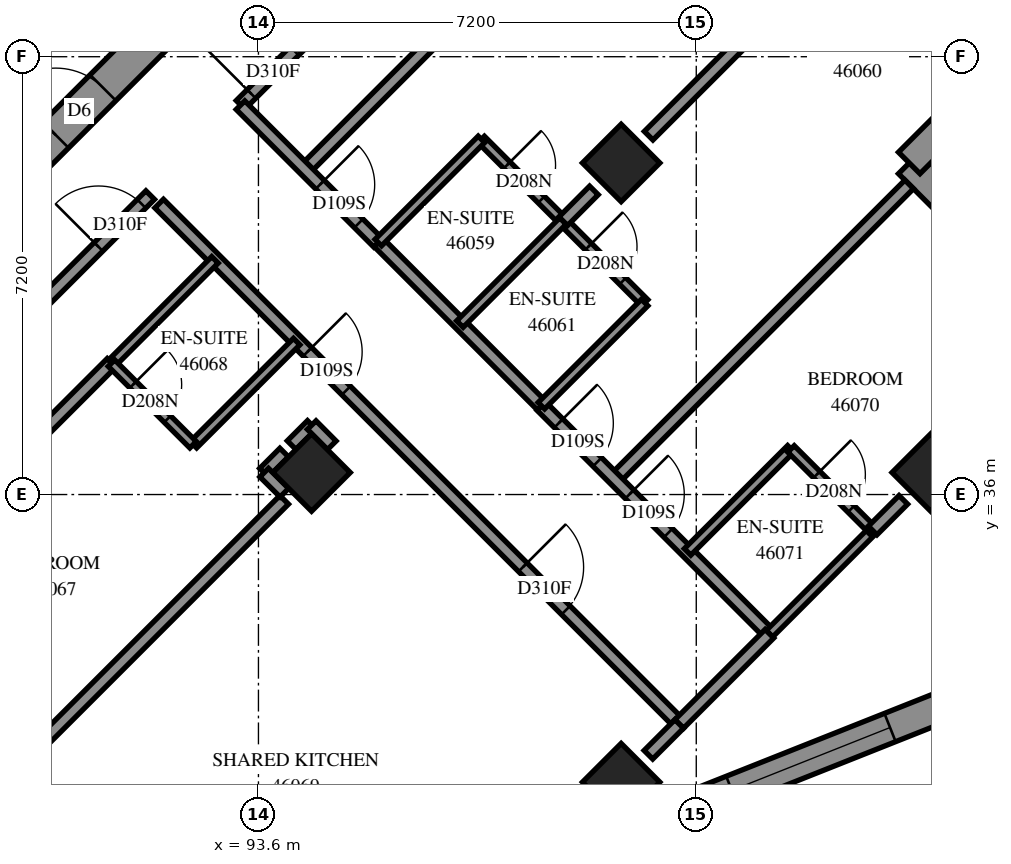
"""IFC4 building model, lengths in metres.
Left out: names, types, materials, properties, quantities, classifications, styles, units other than length and angle.
Written with IfcOpenShell. Run it as: python <this file> out.ifc"""

import sys

from ifc_helpers import new_model, si_unit, direction, frame, frame_2d, origin, origin_2d, place, context, subcontext, project, spatial, polyline, rectangle, outline, extrude, element, fill, save


model = new_model("IFC4")
c1 = context("Model", 3, precision=1e-05, world=origin(), true_north=direction((0.0, 1.0)))
c2 = subcontext(c1, "Body", "Model", "MODEL_VIEW")
j1 = project(units=[si_unit("LENGTHUNIT", "METRE"), si_unit("PLANEANGLEUNIT", "RADIAN")], contexts=[c1])
p1 = place(None, origin())
s1 = spatial("IfcSite", under=j1, at=p1, CompositionType="ELEMENT")
p2 = place(p1, origin())
s2 = spatial("IfcBuilding", under=s1, at=p2, CompositionType="ELEMENT")
p3 = place(p2, frame((0.0, 0.0, 169.4)))
s3 = spatial("IfcBuildingStorey", under=s2, at=p3, CompositionType="ELEMENT", Elevation=169.4)
for number, where, z_axis, x_axis in (
    (1, (99.565, 41.453, 0.0), (0.0, 0.0, 1.0), (0.707, -0.707, 0.0)),
    (2, (94.474, 36.362, 0.0), (0.0, 0.0, 1.0), (0.707, -0.707, 0.0)),
    (3, (104.656, 36.362, 0.0), (0.0, 0.0, 1.0), (0.707, -0.707, 0.0)),
    (4, (99.565, 31.271, 0.0), (0.0, 0.0, 1.0), (0.707, -0.707, 0.0)),
):
    element("IfcColumn", number, at=place(p3, frame(where, z_axis=z_axis, x_axis=x_axis)), inside=s3, PredefinedType="COLUMN", context=c2, shape_type="SweptSolid", body=[
        extrude(rectangle(XDim=0.9, YDim=0.9, at=origin_2d()), origin(), (0.0, 0.0, 1.0), 3.1),
    ])
p4 = place(p3, frame((87.049, 38.695, -0.3), z_axis=(0.0, 0.0, 1.0), x_axis=(0.7071067812, 0.7071067812, 0.0)))
e5 = element("IfcWall", 5, at=p4, inside=s3, PredefinedType="SHEAR", context=c2, shape_type="SweptSolid", body=[
    extrude(rectangle(XDim=14.4, YDim=0.6, at=frame_2d((7.2, 0.0))), origin(), (0.0, 0.0, 1.0), 2.7),
])
p5 = place(p4, frame((4.55, 0.0, 0.3)))
e6 = element("IfcOpeningElement", 6, at=p5, cuts=e5, PredefinedType="OPENING", context=c2, shape_type="SweptSolid", body=[
    extrude(rectangle(XDim=1.1, YDim=2.1, at=frame_2d((0.55, 1.05))), frame((0.0, 0.31, 0.0), z_axis=(0.0, -1.0, 0.0), x_axis=(1.0, 0.0, 0.0)), (0.0, 0.0, 1.0), 0.62),
])
p6 = place(p4, frame((11.35, 0.0, 0.3)))
e7 = element("IfcOpeningElement", 7, at=p6, cuts=e5, PredefinedType="OPENING", context=c2, shape_type="SweptSolid", body=[
    extrude(rectangle(XDim=1.1, YDim=2.1, at=frame_2d((0.55, 1.05))), frame((0.0, 0.31, 0.0), z_axis=(0.0, -1.0, 0.0), x_axis=(1.0, 0.0, 0.0)), (0.0, 0.0, 1.0), 0.62),
])
p7 = place(p3, frame((100.785, 30.896, 0.0), z_axis=(0.0, 0.0, 1.0), x_axis=(0.9293291345, 0.3692524338, 0.0)))
e8 = element("IfcWall", 8, at=p7, inside=s3, PredefinedType="SOLIDWALL", context=c2, shape_type="SweptSolid", body=[
    extrude(outline(polyline([(0.108, -0.25), (5.663, -0.25), (5.437, 0.25), (-0.108, 0.25), (0.108, -0.25)])), origin(), (0.0, 0.0, 1.0), 3.1),
])
p8 = place(p7, frame((0.645, 0.0, 0.45)))
e9 = element("IfcOpeningElement", 9, at=p8, cuts=e8, PredefinedType="OPENING", context=c2, shape_type="SweptSolid", body=[
    extrude(rectangle(XDim=2.8, YDim=2.5, at=frame_2d((1.4, 1.25))), frame((0.0, 0.26, 0.0), z_axis=(0.0, -1.0, 0.0), x_axis=(1.0, 0.0, 0.0)), (0.0, 0.0, 1.0), 0.52),
])
p9 = place(p3, frame((107.761, 37.994, 0.0), z_axis=(0.0, 0.0, 1.0), x_axis=(-0.7071170031, 0.7070965591, 0.0)))
e10 = element("IfcWall", 10, at=p9, inside=s3, PredefinedType="SOLIDWALL", context=c2, shape_type="SweptSolid", body=[
    extrude(outline(polyline([(-0.159, -0.25), (4.641, -0.25), (5.141, 0.25), (0.159, 0.25), (-0.159, -0.25)])), origin(), (0.0, 0.0, 1.0), 3.1),
])
p10 = place(p9, frame((1.966, 0.0, 0.6)))
e11 = element("IfcOpeningElement", 11, at=p10, cuts=e10, PredefinedType="OPENING", context=c2, shape_type="SweptSolid", body=[
    extrude(rectangle(XDim=1.8, YDim=1.9, at=frame_2d((0.9, 0.95))), frame((0.0, 0.26, 0.0), z_axis=(0.0, -1.0, 0.0), x_axis=(1.0, 0.0, 0.0)), (0.0, 0.0, 1.0), 0.52),
])
p11 = place(p3, frame((104.302, 41.453, 0.0), z_axis=(0.0, 0.0, 1.0), x_axis=(0.7071237335, 0.7070898285, 0.0)))
e12 = element("IfcWall", 12, at=p11, inside=s3, PredefinedType="SOLIDWALL", context=c2, shape_type="SweptSolid", body=[
    extrude(outline(polyline([(0.25, -0.25), (6.253, -0.25), (5.545, 0.25), (-0.25, 0.25), (0.25, -0.25)])), origin(), (0.0, 0.0, 1.0), 2.6),
])
p12 = place(p11, frame((1.125, 0.0, 0.6)))
e13 = element("IfcOpeningElement", 13, at=p12, cuts=e12, PredefinedType="OPENING", context=c2, shape_type="SweptSolid", body=[
    extrude(rectangle(XDim=1.8, YDim=1.9, at=frame_2d((0.9, 0.95))), frame((0.0, 0.26, 0.0), z_axis=(0.0, -1.0, 0.0), x_axis=(1.0, 0.0, 0.0)), (0.0, 0.0, 1.0), 0.52),
])
p13 = place(p11, frame((3.997, 0.0, 0.6)))
e14 = element("IfcOpeningElement", 14, at=p13, cuts=e12, PredefinedType="OPENING", context=c2, shape_type="SweptSolid", body=[
    extrude(rectangle(XDim=1.2, YDim=1.9, at=frame_2d((0.6, 0.95))), frame((0.0, 0.26, 0.0), z_axis=(0.0, -1.0, 0.0), x_axis=(1.0, 0.0, 0.0)), (0.0, 0.0, 1.0), 0.52),
])
p14 = place(p3, frame((94.366, 41.348, 0.0), z_axis=(0.0, 0.0, 1.0), x_axis=(0.7071108904, 0.707102672, 0.0)))
e15 = element("IfcWall", 15, at=p14, inside=s3, PredefinedType="PARTITIONING", context=c2, shape_type="SweptSolid", body=[
    extrude(rectangle(XDim=12.168, YDim=0.2, at=frame_2d((6.084, 0.0))), origin(), (0.0, 0.0, 1.0), 3.1),
])
p15 = place(p3, frame((91.967, 40.785, 0.0), z_axis=(0.0, 0.0, 1.0), x_axis=(0.7071067812, -0.7071067812, 0.0)))
e16 = element("IfcWall", 16, at=p15, inside=s3, PredefinedType="PARTITIONING", context=c2, shape_type="SweptSolid", body=[
    extrude(rectangle(XDim=12.1, YDim=0.2, at=frame_2d((6.05, 0.0))), origin(), (0.0, 0.0, 1.0), 3.1),
])
p16 = place(p15, frame((3.448, 0.0, 0.0)))
e17 = element("IfcOpeningElement", 17, at=p16, cuts=e16, PredefinedType="OPENING", context=c2, shape_type="SweptSolid", body=[
    extrude(rectangle(XDim=0.9, YDim=2.1, at=frame_2d((0.45, 1.05))), frame((0.0, 0.11, 0.0), z_axis=(0.0, -1.0, 0.0), x_axis=(1.0, 0.0, 0.0)), (0.0, 0.0, 1.0), 0.22),
])
p17 = place(p15, frame((8.457, 0.0, 0.0)))
e18 = element("IfcOpeningElement", 18, at=p17, cuts=e16, PredefinedType="OPENING", context=c2, shape_type="SweptSolid", body=[
    extrude(rectangle(XDim=1.0, YDim=2.1, at=frame_2d((0.5, 1.05))), frame((0.0, 0.11, 0.0), z_axis=(0.0, -1.0, 0.0), x_axis=(1.0, 0.0, 0.0)), (0.0, 0.0, 1.0), 0.22),
])
p18 = place(p3, frame((93.306, 42.408, 0.0), z_axis=(0.0, 0.0, 1.0), x_axis=(0.7071067812, 0.7071067812, 0.0)))
e19 = element("IfcWall", 19, at=p18, inside=s3, PredefinedType="PARTITIONING", context=c2, shape_type="SweptSolid", body=[
    extrude(rectangle(XDim=9.45, YDim=0.2, at=frame_2d((4.725, 0.0))), origin(), (0.0, 0.0, 1.0), 3.1),
])
p19 = place(p18, frame((0.253, 0.0, 0.0)))
e20 = element("IfcOpeningElement", 20, at=p19, cuts=e19, PredefinedType="OPENING", context=c2, shape_type="SweptSolid", body=[
    extrude(rectangle(XDim=1.0, YDim=2.1, at=frame_2d((0.5, 1.05))), frame((0.0, 0.11, 0.0), z_axis=(0.0, -1.0, 0.0), x_axis=(1.0, 0.0, 0.0)), (0.0, 0.0, 1.0), 0.22),
])
p20 = place(p3, frame((86.834, 35.94, 0.0), z_axis=(0.0, 0.0, 1.0), x_axis=(0.7072486139, 0.7069649201, 0.0)))
e21 = element("IfcWall", 21, at=p20, inside=s3, PredefinedType="PARTITIONING", context=c2, shape_type="SweptSolid", body=[
    extrude(rectangle(XDim=7.05, YDim=0.2, at=frame_2d((3.525, 0.0))), origin(), (0.0, 0.0, 1.0), 3.1),
])
p21 = place(p20, frame((5.848, 0.0, 0.0)))
e22 = element("IfcOpeningElement", 22, at=p21, cuts=e21, PredefinedType="OPENING", context=c2, shape_type="SweptSolid", body=[
    extrude(rectangle(XDim=1.0, YDim=2.1, at=frame_2d((0.5, 1.05))), frame((0.0, 0.11, 0.0), z_axis=(0.0, -1.0, 0.0), x_axis=(1.0, 0.0, 0.0)), (0.0, 0.0, 1.0), 0.22),
])
p22 = place(p3, frame((86.329, 33.313, 0.0), z_axis=(0.0, 0.0, 1.0), x_axis=(0.7072524502, 0.7069610821, 0.0)))
e23 = element("IfcWall", 23, at=p22, inside=s3, PredefinedType="PARTITIONING", context=c2, shape_type="SweptSolid", body=[
    extrude(rectangle(XDim=6.864, YDim=0.2, at=frame_2d((3.432, 0.0))), origin(), (0.0, 0.0, 1.0), 3.1),
])
p23 = place(p3, frame((99.458, 36.256, 0.0), z_axis=(0.0, 0.0, 1.0), x_axis=(0.7071067812, 0.7071067812, 0.0)))
e24 = element("IfcWall", 24, at=p23, inside=s3, PredefinedType="PARTITIONING", context=c2, shape_type="SweptSolid", body=[
    extrude(rectangle(XDim=6.85, YDim=0.2, at=frame_2d((3.425, 0.0))), origin(), (0.0, 0.0, 1.0), 3.1),
])
p24 = place(p3, frame((89.831, 31.721, 0.0), z_axis=(0.0, 0.0, 1.0), x_axis=(0.7071067812, 0.7071067812, 0.0)))
e25 = element("IfcWall", 25, at=p24, inside=s3, PredefinedType="PARTITIONING", context=c2, shape_type="SweptSolid", body=[
    extrude(rectangle(XDim=5.928, YDim=0.2, at=frame_2d((2.964, 0.0))), origin(), (0.0, 0.0, 1.0), 3.1),
])
p25 = place(p3, frame((100.017, 41.901, 0.0), z_axis=(0.0, 0.0, 1.0), x_axis=(0.7072754814, 0.7069380408, 0.0)))
e26 = element("IfcWall", 26, at=p25, inside=s3, PredefinedType="PARTITIONING", context=c2, shape_type="SweptSolid", body=[
    extrude(rectangle(XDim=5.927, YDim=0.2, at=frame_2d((2.963, 0.0))), origin(), (0.0, 0.0, 1.0), 3.1),
])
p26 = place(p3, frame((98.253, 37.455, 0.0), z_axis=(0.0, 0.0, 1.0), x_axis=(0.7071067812, -0.7071067812, 0.0)))
e27 = element("IfcWall", 27, at=p26, inside=s3, PredefinedType="PARTITIONING", context=c2, shape_type="SweptSolid", body=[
    extrude(rectangle(XDim=5.301, YDim=0.2, at=frame_2d((2.65, 0.0))), origin(), (0.0, 0.0, 1.0), 3.1),
])
p27 = place(p26, frame((0.401, 0.0, 0.0)))
e28 = element("IfcOpeningElement", 28, at=p27, cuts=e27, PredefinedType="OPENING", context=c2, shape_type="SweptSolid", body=[
    extrude(rectangle(XDim=0.9, YDim=2.1, at=frame_2d((0.45, 1.05))), frame((0.0, 0.11, 0.0), z_axis=(0.0, -1.0, 0.0), x_axis=(1.0, 0.0, 0.0)), (0.0, 0.0, 1.0), 0.22),
])
p28 = place(p26, frame((2.05, 0.0, 0.0)))
e29 = element("IfcOpeningElement", 29, at=p28, cuts=e27, PredefinedType="OPENING", context=c2, shape_type="SweptSolid", body=[
    extrude(rectangle(XDim=0.9, YDim=2.1, at=frame_2d((0.45, 1.05))), frame((0.0, 0.11, 0.0), z_axis=(0.0, -1.0, 0.0), x_axis=(1.0, 0.0, 0.0)), (0.0, 0.0, 1.0), 0.22),
])
p29 = place(p3, frame((97.263, 41.839, 0.0), z_axis=(0.0, 0.0, 1.0), x_axis=(0.7071067812, -0.7071067812, 0.0)))
e30 = element("IfcWall", 30, at=p29, inside=s3, PredefinedType="PARTITIONING", context=c2, shape_type="SweptSolid", body=[
    extrude(rectangle(XDim=3.801, YDim=0.15, at=frame_2d((1.901, 0.0))), origin(), (0.0, 0.0, 1.0), 3.1),
])
p30 = place(p29, frame((0.598, 0.0, 0.0)))
e31 = element("IfcOpeningElement", 31, at=p30, cuts=e30, PredefinedType="OPENING", context=c2, shape_type="SweptSolid", body=[
    extrude(rectangle(XDim=0.8, YDim=2.1, at=frame_2d((0.4, 1.05))), frame((0.0, 0.085, 0.0), z_axis=(0.0, -1.0, 0.0), x_axis=(1.0, 0.0, 0.0)), (0.0, 0.0, 1.0), 0.17),
])
p31 = place(p29, frame((2.493, 0.0, 0.0)))
e32 = element("IfcOpeningElement", 32, at=p31, cuts=e30, PredefinedType="OPENING", context=c2, shape_type="SweptSolid", body=[
    extrude(rectangle(XDim=0.8, YDim=2.1, at=frame_2d((0.4, 1.05))), frame((0.0, 0.085, 0.0), z_axis=(0.0, -1.0, 0.0), x_axis=(1.0, 0.0, 0.0)), (0.0, 0.0, 1.0), 0.17),
])
p32 = place(p3, frame((95.573, 40.148, 0.0), z_axis=(0.0, 0.0, 1.0), x_axis=(0.7068698107, -0.7073436723, 0.0)))
e33 = element("IfcWall", 33, at=p32, inside=s3, PredefinedType="PARTITIONING", context=c2, shape_type="SweptSolid", body=[
    extrude(rectangle(XDim=3.799, YDim=0.2, at=frame_2d((1.899, 0.0))), origin(), (0.0, 0.0, 1.0), 3.1),
])
p33 = place(p3, frame((93.305, 42.403, 0.0), z_axis=(0.0, 0.0, 1.0), x_axis=(0.7071067812, -0.7071067812, 0.0)))
e34 = element("IfcWall", 34, at=p33, inside=s3, PredefinedType="PARTITIONING", context=c2, shape_type="SweptSolid", body=[
    extrude(rectangle(XDim=3.199, YDim=0.2, at=frame_2d((1.599, 0.0))), origin(), (0.0, 0.0, 1.0), 3.1),
])
p34 = place(p33, frame((1.848, 0.0, 0.0)))
e35 = element("IfcOpeningElement", 35, at=p34, cuts=e34, PredefinedType="OPENING", context=c2, shape_type="SweptSolid", body=[
    extrude(rectangle(XDim=0.9, YDim=2.1, at=frame_2d((0.45, 1.05))), frame((0.0, 0.11, 0.0), z_axis=(0.0, -1.0, 0.0), x_axis=(1.0, 0.0, 0.0)), (0.0, 0.0, 1.0), 0.22),
])
p35 = place(p3, frame((102.003, 33.711, 0.0), z_axis=(0.0, 0.0, 1.0), x_axis=(0.7071067812, 0.7071067812, 0.0)))
e36 = element("IfcWall", 36, at=p35, inside=s3, PredefinedType="PARTITIONING", context=c2, shape_type="SweptSolid", body=[
    extrude(rectangle(XDim=2.401, YDim=0.15, at=frame_2d((1.201, 0.0))), origin(), (0.0, 0.0, 1.0), 2.6),
])
for number, where, z_axis, x_axis in (
    (37, (95.571, 40.143, 0.0), (0.0, 0.0, 1.0), (0.707, 0.708, 0.0)),
    (38, (98.253, 37.461, 0.0), (0.0, 0.0, 1.0), (0.708, 0.707, 0.0)),
    (39, (100.657, 35.057, 0.0), (0.0, 0.0, 1.0), (0.708, 0.707, 0.0)),
    (40, (91.189, 38.161, 0.0), (0.0, 0.0, 1.0), (0.707, 0.708, 0.0)),
    (41, (92.531, 36.819, 0.0), (0.0, 0.0, 1.0), (0.708, 0.707, 0.0)),
):
    element("IfcWall", number, at=place(p3, frame(where, z_axis=z_axis, x_axis=x_axis)), inside=s3, PredefinedType="PARTITIONING", context=c2, shape_type="SweptSolid", body=[
        extrude(rectangle(XDim=2.4, YDim=0.15, at=frame_2d((1.2, 0.0))), origin(), (0.0, 0.0, 1.0), 3.1),
    ])
p36 = place(p3, frame((96.913, 38.803, 0.0), z_axis=(0.0, 0.0, 1.0), x_axis=(0.7071067812, 0.7071067812, 0.0)))
e42 = element("IfcWall", 42, at=p36, inside=s3, PredefinedType="PARTITIONING", context=c2, shape_type="SweptSolid", body=[
    extrude(rectangle(XDim=2.398, YDim=0.15, at=frame_2d((1.199, 0.0))), origin(), (0.0, 0.0, 1.0), 3.1),
])
p37 = place(p3, frame((100.519, 32.227, 0.0), z_axis=(0.0, 0.0, 1.0), x_axis=(0.7071067812, 0.7071067812, 0.0)))
e43 = element("IfcWall", 43, at=p37, inside=s3, PredefinedType="PARTITIONING", context=c2, shape_type="SweptSolid", body=[
    extrude(rectangle(XDim=2.099, YDim=0.2, at=frame_2d((1.049, 0.0))), origin(), (0.0, 0.0, 1.0), 2.6),
])
p38 = place(p3, frame((102.358, 36.75, 0.0), z_axis=(0.0, 0.0, 1.0), x_axis=(0.7076330979, -0.7065800724, 0.0)))
e44 = element("IfcWall", 44, at=p38, inside=s3, PredefinedType="PARTITIONING", context=c2, shape_type="SweptSolid", body=[
    extrude(rectangle(XDim=1.899, YDim=0.15, at=frame_2d((0.95, 0.0))), origin(), (0.0, 0.0, 1.0), 3.1),
])
p39 = place(p38, frame((0.597, 0.0, 0.0)))
e45 = element("IfcOpeningElement", 45, at=p39, cuts=e44, PredefinedType="OPENING", context=c2, shape_type="SweptSolid", body=[
    extrude(rectangle(XDim=0.8, YDim=2.1, at=frame_2d((0.4, 1.05))), frame((0.0, 0.085, 0.0), z_axis=(0.0, -1.0, 0.0), x_axis=(1.0, 0.0, 0.0)), (0.0, 0.0, 1.0), 0.17),
])
p40 = place(p3, frame((91.183, 38.161, 0.0), z_axis=(0.0, 0.0, 1.0), x_axis=(0.7071067812, -0.7071067812, 0.0)))
e46 = element("IfcWall", 46, at=p40, inside=s3, PredefinedType="PARTITIONING", context=c2, shape_type="SweptSolid", body=[
    extrude(rectangle(XDim=1.898, YDim=0.15, at=frame_2d((0.949, 0.0))), origin(), (0.0, 0.0, 1.0), 3.1),
])
p41 = place(p40, frame((0.501, 0.0, 0.0)))
e47 = element("IfcOpeningElement", 47, at=p41, cuts=e46, PredefinedType="OPENING", context=c2, shape_type="SweptSolid", body=[
    extrude(rectangle(XDim=0.8, YDim=2.1, at=frame_2d((0.4, 1.05))), frame((0.0, 0.085, 0.0), z_axis=(0.0, -1.0, 0.0), x_axis=(1.0, 0.0, 0.0)), (0.0, 0.0, 1.0), 0.17),
])
p42 = place(p3, frame((100.013, 31.721, 0.0), z_axis=(0.0, 0.0, 1.0), x_axis=(0.7071067812, 0.7071067812, 0.0)))
e48 = element("IfcWall", 48, at=p42, inside=s3, PredefinedType="PARTITIONING", context=c2, shape_type="SweptSolid", body=[
    extrude(rectangle(XDim=0.716, YDim=0.2, at=frame_2d((0.358, 0.0))), origin(), (0.0, 0.0, 1.0), 2.6),
])
p43 = place(p3, frame((98.613, 40.495, 0.0), z_axis=(0.0, 0.0, 1.0), x_axis=(0.7057051861, 0.7085056035, 0.0)))
e49 = element("IfcWall", 49, at=p43, inside=s3, PredefinedType="PARTITIONING", context=c2, shape_type="SweptSolid", body=[
    extrude(rectangle(XDim=0.714, YDim=0.2, at=frame_2d((0.357, 0.0))), origin(), (0.0, 0.0, 1.0), 3.1),
])
p44 = place(p3, frame((103.701, 35.409, 0.0), z_axis=(0.0, 0.0, 1.0), x_axis=(0.7071067812, 0.7071067812, 0.0)))
e50 = element("IfcWall", 50, at=p44, inside=s3, PredefinedType="PARTITIONING", context=c2, shape_type="SweptSolid", body=[
    extrude(rectangle(XDim=0.713, YDim=0.2, at=frame_2d((0.356, 0.0))), origin(), (0.0, 0.0, 1.0), 2.6),
])
for number, where, z_axis, x_axis in (
    (51, (94.145, 36.813, 0.0), (0.0, 0.0, 1.0), (0.707, 0.707, 0.0)),
    (52, (93.691, 36.359, 0.0), (0.0, 0.0, 1.0), (0.707, 0.707, 0.0)),
):
    element("IfcWall", number, at=place(p3, frame(where, z_axis=z_axis, x_axis=x_axis)), inside=s3, PredefinedType="PARTITIONING", context=c2, shape_type="SweptSolid", body=[
        extrude(rectangle(XDim=0.469, YDim=0.2, at=frame_2d((0.235, 0.0))), origin(), (0.0, 0.0, 1.0), 3.1),
    ])
for number, where, z_axis, x_axis in (
    (53, (94.476, 37.142, 0.0), (0.0, 0.0, 1.0), (0.705, -0.709, 0.0)),
    (54, (93.695, 36.361, 0.0), (0.0, 0.0, 1.0), (0.709, -0.705, 0.0)),
):
    element("IfcWall", number, at=place(p3, frame(where, z_axis=z_axis, x_axis=x_axis)), inside=s3, PredefinedType="PARTITIONING", context=c2, shape_type="SweptSolid", body=[
        extrude(rectangle(XDim=0.468, YDim=0.2, at=frame_2d((0.234, 0.0))), origin(), (0.0, 0.0, 1.0), 3.1),
    ])
p45 = place(p8, origin())
e55 = element("IfcWindow", 55, at=p45, inside=s3, PartitioningType="SINGLE_PANEL", PredefinedType="WINDOW", context=c2, shape_type="SweptSolid", body=[
    extrude(rectangle(XDim=2.8, YDim=2.5, at=frame_2d((1.4, 1.25))), frame((0.0, 0.18, 0.0), z_axis=(0.0, -1.0, 0.0), x_axis=(1.0, 0.0, 0.0)), (0.0, 0.0, 1.0), 0.06),
])
fill(e9, e55)
p46 = place(p5, origin())
e56 = element("IfcDoor", 56, at=p46, inside=s3, OperationType="DOUBLE_DOOR_SINGLE_SWING", PredefinedType="DOOR", context=c2, shape_type="SweptSolid", body=[
    extrude(rectangle(XDim=1.1, YDim=2.1, at=frame_2d((0.55, 1.05))), frame((0.0, 0.025, 0.0), z_axis=(0.0, -1.0, 0.0), x_axis=(1.0, 0.0, 0.0)), (0.0, 0.0, 1.0), 0.05),
])
fill(e6, e56)
p47 = place(p19, origin())
e57 = element("IfcDoor", 57, at=p47, inside=s3, OperationType="SINGLE_SWING_RIGHT", PredefinedType="DOOR", context=c2, shape_type="SweptSolid", body=[
    extrude(rectangle(XDim=1.0, YDim=2.1, at=frame_2d((0.5, 1.05))), frame((0.0, 0.025, 0.0), z_axis=(0.0, -1.0, 0.0), x_axis=(1.0, 0.0, 0.0)), (0.0, 0.0, 1.0), 0.05),
])
fill(e20, e57)
p48 = place(p34, origin())
e58 = element("IfcDoor", 58, at=p48, inside=s3, OperationType="SINGLE_SWING_RIGHT", PredefinedType="DOOR", context=c2, shape_type="SweptSolid", body=[
    extrude(rectangle(XDim=0.9, YDim=2.1, at=frame_2d((0.45, 1.05))), frame((0.0, 0.025, 0.0), z_axis=(0.0, -1.0, 0.0), x_axis=(1.0, 0.0, 0.0)), (0.0, 0.0, 1.0), 0.05),
])
fill(e35, e58)
p49 = place(p30, origin())
e59 = element("IfcDoor", 59, at=p49, inside=s3, OperationType="SINGLE_SWING_RIGHT", PredefinedType="DOOR", context=c2, shape_type="SweptSolid", body=[
    extrude(rectangle(XDim=0.8, YDim=2.1, at=frame_2d((0.4, 1.05))), frame((0.0, 0.025, 0.0), z_axis=(0.0, -1.0, 0.0), x_axis=(1.0, 0.0, 0.0)), (0.0, 0.0, 1.0), 0.05),
])
fill(e31, e59)
p50 = place(p27, origin())
e60 = element("IfcDoor", 60, at=p50, inside=s3, OperationType="SINGLE_SWING_LEFT", PredefinedType="DOOR", context=c2, shape_type="SweptSolid", body=[
    extrude(rectangle(XDim=0.9, YDim=2.1, at=frame_2d((0.45, 1.05))), frame((0.0, 0.025, 0.0), z_axis=(0.0, -1.0, 0.0), x_axis=(1.0, 0.0, 0.0)), (0.0, 0.0, 1.0), 0.05),
])
fill(e28, e60)
p51 = place(p31, origin())
e61 = element("IfcDoor", 61, at=p51, inside=s3, OperationType="SINGLE_SWING_RIGHT", PredefinedType="DOOR", context=c2, shape_type="SweptSolid", body=[
    extrude(rectangle(XDim=0.8, YDim=2.1, at=frame_2d((0.4, 1.05))), frame((0.0, 0.025, 0.0), z_axis=(0.0, -1.0, 0.0), x_axis=(1.0, 0.0, 0.0)), (0.0, 0.0, 1.0), 0.05),
])
fill(e32, e61)
p52 = place(p21, origin())
e62 = element("IfcDoor", 62, at=p52, inside=s3, OperationType="SINGLE_SWING_RIGHT", PredefinedType="DOOR", context=c2, shape_type="SweptSolid", body=[
    extrude(rectangle(XDim=1.0, YDim=2.1, at=frame_2d((0.5, 1.05))), frame((0.0, 0.025, 0.0), z_axis=(0.0, -1.0, 0.0), x_axis=(1.0, 0.0, 0.0)), (0.0, 0.0, 1.0), 0.05),
])
fill(e22, e62)
p53 = place(p16, origin())
e63 = element("IfcDoor", 63, at=p53, inside=s3, OperationType="SINGLE_SWING_LEFT", PredefinedType="DOOR", context=c2, shape_type="SweptSolid", body=[
    extrude(rectangle(XDim=0.9, YDim=2.1, at=frame_2d((0.45, 1.05))), frame((0.0, 0.025, 0.0), z_axis=(0.0, -1.0, 0.0), x_axis=(1.0, 0.0, 0.0)), (0.0, 0.0, 1.0), 0.05),
])
fill(e17, e63)
p54 = place(p41, origin())
e64 = element("IfcDoor", 64, at=p54, inside=s3, OperationType="SINGLE_SWING_RIGHT", PredefinedType="DOOR", context=c2, shape_type="SweptSolid", body=[
    extrude(rectangle(XDim=0.8, YDim=2.1, at=frame_2d((0.4, 1.05))), frame((0.0, 0.025, 0.0), z_axis=(0.0, -1.0, 0.0), x_axis=(1.0, 0.0, 0.0)), (0.0, 0.0, 1.0), 0.05),
])
fill(e47, e64)
p55 = place(p17, origin())
e65 = element("IfcDoor", 65, at=p55, inside=s3, OperationType="SINGLE_SWING_RIGHT", PredefinedType="DOOR", context=c2, shape_type="SweptSolid", body=[
    extrude(rectangle(XDim=1.0, YDim=2.1, at=frame_2d((0.5, 1.05))), frame((0.0, 0.025, 0.0), z_axis=(0.0, -1.0, 0.0), x_axis=(1.0, 0.0, 0.0)), (0.0, 0.0, 1.0), 0.05),
])
fill(e18, e65)
p56 = place(p28, origin())
e66 = element("IfcDoor", 66, at=p56, inside=s3, OperationType="SINGLE_SWING_RIGHT", PredefinedType="DOOR", context=c2, shape_type="SweptSolid", body=[
    extrude(rectangle(XDim=0.9, YDim=2.1, at=frame_2d((0.45, 1.05))), frame((0.0, 0.025, 0.0), z_axis=(0.0, -1.0, 0.0), x_axis=(1.0, 0.0, 0.0)), (0.0, 0.0, 1.0), 0.05),
])
fill(e29, e66)
p57 = place(p39, origin())
e67 = element("IfcDoor", 67, at=p57, inside=s3, OperationType="SINGLE_SWING_RIGHT", PredefinedType="DOOR", context=c2, shape_type="SweptSolid", body=[
    extrude(rectangle(XDim=0.8, YDim=2.1, at=frame_2d((0.4, 1.05))), frame((0.0, 0.025, 0.0), z_axis=(0.0, -1.0, 0.0), x_axis=(1.0, 0.0, 0.0)), (0.0, 0.0, 1.0), 0.05),
])
fill(e45, e67)
save(model, sys.argv[1])
